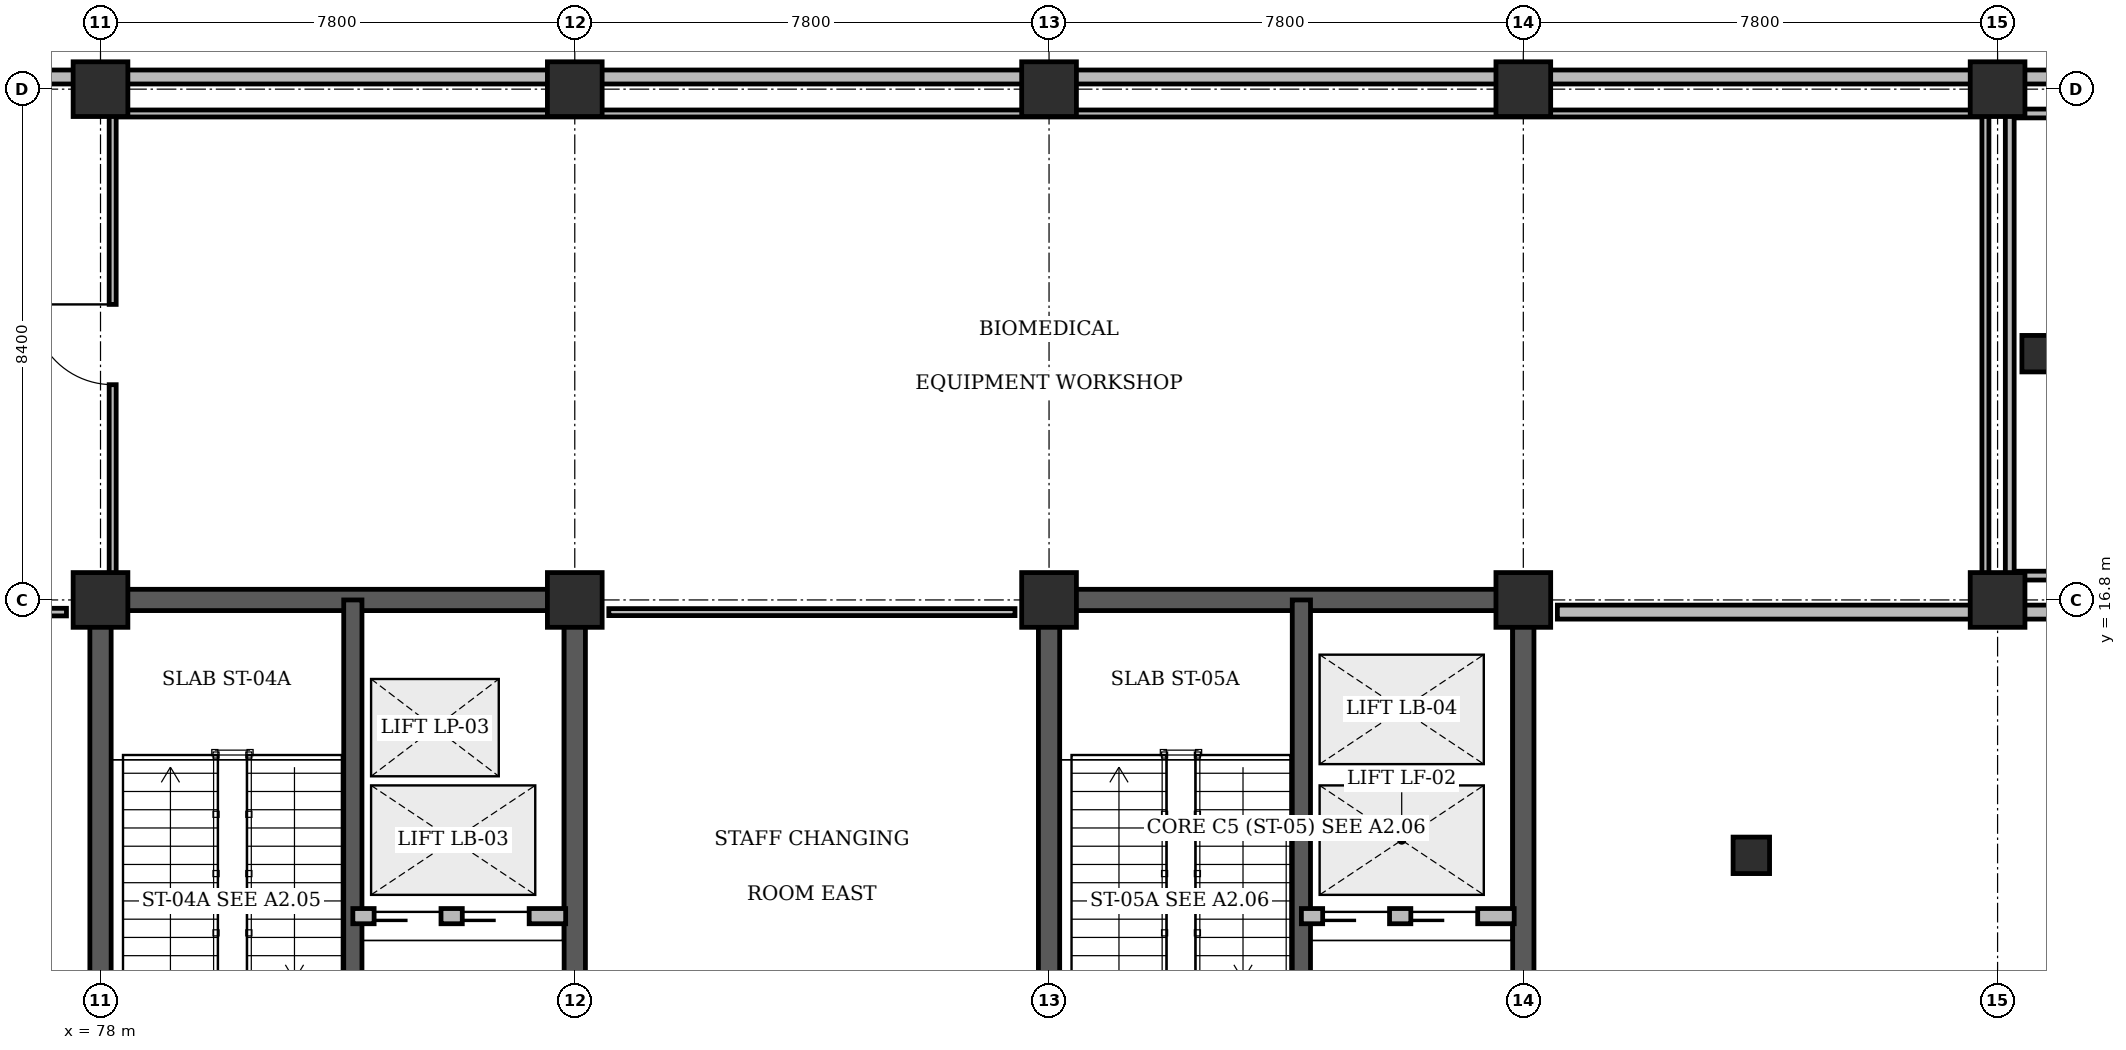
"""IFC4 building model, lengths in metres.
Left out: names, types, materials, properties, quantities, classifications, styles, units other than length and angle.
Written with IfcOpenShell. Run it as: python <this file> out.ifc"""

import sys

from ifc_helpers import new_model, si_unit, direction, frame, frame_2d, origin, origin_2d, place, context, subcontext, project, spatial, rectangle, circle, extrude, element, fill, save


model = new_model("IFC4")
c1 = context("Model", 3, precision=1e-05, world=origin(), true_north=direction((0.0, 1.0)))
c2 = subcontext(c1, "Body", "Model", "MODEL_VIEW")
j1 = project(units=[si_unit("LENGTHUNIT", "METRE"), si_unit("PLANEANGLEUNIT", "RADIAN")], contexts=[c1])
p1 = place(None, origin())
s1 = spatial("IfcSite", under=j1, at=p1, CompositionType="ELEMENT")
p2 = place(p1, origin())
s2 = spatial("IfcBuilding", under=s1, at=p2, CompositionType="ELEMENT")
p3 = place(p2, frame((0.0, 0.0, -4.8)))
s3 = spatial("IfcBuildingStorey", under=s2, at=p3, CompositionType="ELEMENT", Elevation=-4.8)
p4 = place(p3, frame((77.825, 16.8, 0.0), z_axis=(0.0, 0.0, 1.0), x_axis=(1.0, 0.0, 0.0)))
e1 = element("IfcWall", 1, at=p4, inside=s3, PredefinedType="SHEAR", context=c2, shape_type="SweptSolid", body=[
    extrude(rectangle(XDim=8.15, YDim=0.35, at=frame_2d((4.075, 0.0))), origin(), (0.0, 0.0, 1.0), 4.4),
])
for number, where, z_axis, x_axis in (
    (2, (78.0, 8.4, 0.0), (0.0, 0.0, 1.0), (0.0, 1.0, 0.0)),
    (3, (85.8, 8.4, 0.0), (0.0, 0.0, 1.0), (0.0, 1.0, 0.0)),
):
    element("IfcWall", number, at=place(p3, frame(where, z_axis=z_axis, x_axis=x_axis)), inside=s3, PredefinedType="SHEAR", context=c2, shape_type="SweptSolid", body=[
        extrude(rectangle(XDim=8.4, YDim=0.35, at=frame_2d((4.2, 0.0))), origin(), (0.0, 0.0, 1.0), 4.4),
    ])
p5 = place(p3, frame((93.425, 16.8, 0.0), z_axis=(0.0, 0.0, 1.0), x_axis=(1.0, 0.0, 0.0)))
e4 = element("IfcWall", 4, at=p5, inside=s3, PredefinedType="SHEAR", context=c2, shape_type="SweptSolid", body=[
    extrude(rectangle(XDim=8.15, YDim=0.35, at=frame_2d((4.075, 0.0))), origin(), (0.0, 0.0, 1.0), 4.4),
])
for number, where, z_axis, x_axis in (
    (5, (93.6, 8.4, 0.0), (0.0, 0.0, 1.0), (0.0, 1.0, 0.0)),
    (6, (101.4, 8.4, 0.0), (0.0, 0.0, 1.0), (0.0, 1.0, 0.0)),
):
    element("IfcWall", number, at=place(p3, frame(where, z_axis=z_axis, x_axis=x_axis)), inside=s3, PredefinedType="SHEAR", context=c2, shape_type="SweptSolid", body=[
        extrude(rectangle(XDim=8.4, YDim=0.35, at=frame_2d((4.2, 0.0))), origin(), (0.0, 0.0, 1.0), 4.4),
    ])
for number, where, z_axis, x_axis in (
    (7, (78.0, 16.8, 0.0), (0.0, 0.0, 1.0), (1.0, 0.0, 0.0)),
    (8, (78.0, 25.2, 0.0), (0.0, 0.0, 1.0), (1.0, 0.0, 0.0)),
    (9, (85.8, 16.8, 0.0), (0.0, 0.0, 1.0), (1.0, 0.0, 0.0)),
    (10, (85.8, 25.2, 0.0), (0.0, 0.0, 1.0), (1.0, 0.0, 0.0)),
    (11, (93.6, 16.8, 0.0), (0.0, 0.0, 1.0), (1.0, 0.0, 0.0)),
    (12, (93.6, 25.2, 0.0), (0.0, 0.0, 1.0), (1.0, 0.0, 0.0)),
    (13, (101.4, 16.8, 0.0), (0.0, 0.0, 1.0), (1.0, 0.0, 0.0)),
    (14, (101.4, 25.2, 0.0), (0.0, 0.0, 1.0), (1.0, 0.0, 0.0)),
    (15, (109.2, 16.8, 0.0), (0.0, 0.0, 1.0), (1.0, 0.0, 0.0)),
    (16, (109.2, 25.2, 0.0), (0.0, 0.0, 1.0), (1.0, 0.0, 0.0)),
):
    element("IfcColumn", number, at=place(p3, frame(where, z_axis=z_axis, x_axis=x_axis)), inside=s3, PredefinedType="COLUMN", context=c2, shape_type="SweptSolid", body=[
        extrude(rectangle(XDim=0.9, YDim=0.9, at=origin_2d()), origin(), (0.0, 0.0, 1.0), 4.8),
    ])
for number, where, z_axis, x_axis in (
    (17, (109.9, 20.85, -0.4), (0.0, 0.0, 1.0), (1.0, 0.0, 0.0)),
    (18, (105.15, 12.6, -0.4), (0.0, 0.0, 1.0), (1.0, 0.0, 0.0)),
):
    element("IfcColumn", number, at=place(p3, frame(where, z_axis=z_axis, x_axis=x_axis)), inside=s3, PredefinedType="PILASTER", context=c2, shape_type="SweptSolid", body=[
        extrude(circle(Radius=0.3, at=origin_2d()), origin(), (0.0, 0.0, 1.0), 5.2),
    ])
p6 = place(p3, frame((82.15, 8.4, 0.0), z_axis=(0.0, 0.0, 1.0), x_axis=(0.0, 1.0, 0.0)))
e19 = element("IfcWall", 19, at=p6, inside=s3, PredefinedType="SHEAR", context=c2, shape_type="SweptSolid", body=[
    extrude(rectangle(XDim=8.4, YDim=0.3, at=frame_2d((4.2, 0.0))), origin(), (0.0, 0.0, 1.0), 4.8),
])
p7 = place(p3, frame((82.15, 11.6, 0.0), z_axis=(0.0, 0.0, 1.0), x_axis=(1.0, 0.0, 0.0)))
e20 = element("IfcWall", 20, at=p7, inside=s3, PredefinedType="STANDARD", context=c2, shape_type="SweptSolid", body=[
    extrude(rectangle(XDim=3.5, YDim=0.25, at=frame_2d((1.75, 0.0))), origin(), (0.0, 0.0, 1.0), 4.46),
])
p8 = place(p7, frame((0.35, 0.0, 0.0)))
e21 = element("IfcOpeningElement", 21, at=p8, cuts=e20, PredefinedType="OPENING", context=c2, shape_type="SweptSolid", body=[
    extrude(rectangle(XDim=1.1, YDim=2.2, at=frame_2d((0.55, 1.1))), frame((0.0, 0.135, 0.0), z_axis=(0.0, -1.0, 0.0), x_axis=(1.0, 0.0, 0.0)), (0.0, 0.0, 1.0), 0.27),
])
p9 = place(p7, frame((1.8, 0.0, 0.0)))
e22 = element("IfcOpeningElement", 22, at=p9, cuts=e20, PredefinedType="OPENING", context=c2, shape_type="SweptSolid", body=[
    extrude(rectangle(XDim=1.1, YDim=2.2, at=frame_2d((0.55, 1.1))), frame((0.0, 0.135, 0.0), z_axis=(0.0, -1.0, 0.0), x_axis=(1.0, 0.0, 0.0)), (0.0, 0.0, 1.0), 0.27),
])
p10 = place(p3, frame((97.75, 8.4, 0.0), z_axis=(0.0, 0.0, 1.0), x_axis=(0.0, 1.0, 0.0)))
e23 = element("IfcWall", 23, at=p10, inside=s3, PredefinedType="SHEAR", context=c2, shape_type="SweptSolid", body=[
    extrude(rectangle(XDim=8.4, YDim=0.3, at=frame_2d((4.2, 0.0))), origin(), (0.0, 0.0, 1.0), 4.8),
])
p11 = place(p10, frame((0.4, 0.0, 0.0)))
e24 = element("IfcOpeningElement", 24, at=p11, cuts=e23, PredefinedType="OPENING", context=c2, shape_type="SweptSolid", body=[
    extrude(rectangle(XDim=1.12, YDim=2.15, at=frame_2d((0.56, 1.075))), frame((0.0, 0.16, 0.0), z_axis=(0.0, -1.0, 0.0), x_axis=(1.0, 0.0, 0.0)), (0.0, 0.0, 1.0), 0.32),
])
p12 = place(p3, frame((97.75, 11.6, 0.0), z_axis=(0.0, 0.0, 1.0), x_axis=(1.0, 0.0, 0.0)))
e25 = element("IfcWall", 25, at=p12, inside=s3, PredefinedType="STANDARD", context=c2, shape_type="SweptSolid", body=[
    extrude(rectangle(XDim=3.5, YDim=0.25, at=frame_2d((1.75, 0.0))), origin(), (0.0, 0.0, 1.0), 4.46),
])
p13 = place(p12, frame((0.35, 0.0, 0.0)))
e26 = element("IfcOpeningElement", 26, at=p13, cuts=e25, PredefinedType="OPENING", context=c2, shape_type="SweptSolid", body=[
    extrude(rectangle(XDim=1.1, YDim=2.2, at=frame_2d((0.55, 1.1))), frame((0.0, 0.135, 0.0), z_axis=(0.0, -1.0, 0.0), x_axis=(1.0, 0.0, 0.0)), (0.0, 0.0, 1.0), 0.27),
])
p14 = place(p12, frame((1.8, 0.0, 0.0)))
e27 = element("IfcOpeningElement", 27, at=p14, cuts=e25, PredefinedType="OPENING", context=c2, shape_type="SweptSolid", body=[
    extrude(rectangle(XDim=1.1, YDim=2.2, at=frame_2d((0.55, 1.1))), frame((0.0, 0.135, 0.0), z_axis=(0.0, -1.0, 0.0), x_axis=(1.0, 0.0, 0.0)), (0.0, 0.0, 1.0), 0.27),
])
p15 = place(p3, frame((74.0, 16.6, 0.0), z_axis=(0.0, 0.0, 1.0), x_axis=(1.0, 0.0, 0.0)))
e28 = element("IfcWall", 28, at=p15, inside=s3, PredefinedType="PARTITIONING", context=c2, shape_type="SweptSolid", body=[
    extrude(rectangle(XDim=3.44, YDim=0.125, at=frame_2d((1.72, 0.0))), origin(), (0.0, 0.0, 1.0), 3.53),
])
p16 = place(p3, frame((78.2, 24.8, 0.0), z_axis=(0.0, 0.0, 1.0), x_axis=(1.0, 0.0, 0.0)))
e29 = element("IfcWall", 29, at=p16, inside=s3, PredefinedType="PARTITIONING", context=c2, shape_type="SweptSolid", body=[
    extrude(rectangle(XDim=30.8, YDim=0.115, at=frame_2d((15.4, 0.0))), origin(), (0.0, 0.0, 1.0), 3.53),
])
p17 = place(p3, frame((78.2, 17.2, 0.0), z_axis=(0.0, 0.0, 1.0), x_axis=(0.0, 1.0, 0.0)))
e30 = element("IfcWall", 30, at=p17, inside=s3, PredefinedType="PARTITIONING", context=c2, shape_type="SweptSolid", body=[
    extrude(rectangle(XDim=7.6, YDim=0.115, at=frame_2d((3.8, 0.0))), origin(), (0.0, 0.0, 1.0), 3.515),
])
p18 = place(p17, frame((3.14, 0.0, 0.0)))
e31 = element("IfcOpeningElement", 31, at=p18, cuts=e30, PredefinedType="OPENING", context=c2, shape_type="SweptSolid", body=[
    extrude(rectangle(XDim=1.32, YDim=2.15, at=frame_2d((0.66, 1.075))), frame((0.0, 0.067, 0.0), z_axis=(0.0, -1.0, 0.0), x_axis=(1.0, 0.0, 0.0)), (0.0, 0.0, 1.0), 0.135),
])
p19 = place(p3, frame((109.0, 17.2, 0.0), z_axis=(0.0, 0.0, 1.0), x_axis=(0.0, 1.0, 0.0)))
e32 = element("IfcWall", 32, at=p19, inside=s3, PredefinedType="PARTITIONING", context=c2, shape_type="SweptSolid", body=[
    extrude(rectangle(XDim=7.6, YDim=0.115, at=frame_2d((3.8, 0.0))), origin(), (0.0, 0.0, 1.0), 3.515),
])
p20 = place(p3, frame((109.4, 17.2, 0.0), z_axis=(0.0, 0.0, 1.0), x_axis=(1.0, 0.0, 0.0)))
e33 = element("IfcWall", 33, at=p20, inside=s3, PredefinedType="PARTITIONING", context=c2, shape_type="SweptSolid", body=[
    extrude(rectangle(XDim=22.8, YDim=0.145, at=frame_2d((11.4, 0.0))), origin(), (0.0, 0.0, 1.0), 3.53),
])
p21 = place(p20, frame((10.825, 0.0, 0.0)))
e34 = element("IfcOpeningElement", 34, at=p21, cuts=e33, PredefinedType="OPENING", context=c2, shape_type="SweptSolid", body=[
    extrude(rectangle(XDim=1.15, YDim=2.15, at=frame_2d((0.575, 1.075))), frame((0.0, 0.083, 0.0), z_axis=(0.0, -1.0, 0.0), x_axis=(1.0, 0.0, 0.0)), (0.0, 0.0, 1.0), 0.165),
])
p22 = place(p3, frame((109.4, 24.8, 0.0), z_axis=(0.0, 0.0, 1.0), x_axis=(1.0, 0.0, 0.0)))
e35 = element("IfcWall", 35, at=p22, inside=s3, PredefinedType="PARTITIONING", context=c2, shape_type="SweptSolid", body=[
    extrude(rectangle(XDim=22.8, YDim=0.145, at=frame_2d((11.4, 0.0))), origin(), (0.0, 0.0, 1.0), 3.53),
])
p23 = place(p3, frame((109.4, 17.2, 0.0), z_axis=(0.0, 0.0, 1.0), x_axis=(0.0, 1.0, 0.0)))
e36 = element("IfcWall", 36, at=p23, inside=s3, PredefinedType="PARTITIONING", context=c2, shape_type="SweptSolid", body=[
    extrude(rectangle(XDim=7.6, YDim=0.145, at=frame_2d((3.8, 0.0))), origin(), (0.0, 0.0, 1.0), 3.515),
])
p24 = place(p3, frame((86.36, 16.6, 0.0), z_axis=(0.0, 0.0, 1.0), x_axis=(1.0, 0.0, 0.0)))
e37 = element("IfcWall", 37, at=p24, inside=s3, PredefinedType="PARTITIONING", context=c2, shape_type="SweptSolid", body=[
    extrude(rectangle(XDim=6.68, YDim=0.115, at=frame_2d((3.34, 0.0))), origin(), (0.0, 0.0, 1.0), 3.53),
])
p25 = place(p3, frame((101.96, 16.6, 0.0), z_axis=(0.0, 0.0, 1.0), x_axis=(1.0, 0.0, 0.0)))
e38 = element("IfcWall", 38, at=p25, inside=s3, PredefinedType="STANDARD", context=c2, shape_type="SweptSolid", body=[
    extrude(rectangle(XDim=30.24, YDim=0.23, at=frame_2d((15.12, 0.0))), origin(), (0.0, 0.0, 1.0), 3.53),
])
p26 = place(p3, frame((74.0, 25.4, 0.0), z_axis=(0.0, 0.0, 1.0), x_axis=(1.0, 0.0, 0.0)))
e39 = element("IfcWall", 39, at=p26, inside=s3, PredefinedType="STANDARD", context=c2, shape_type="SweptSolid", body=[
    extrude(rectangle(XDim=58.2, YDim=0.23, at=frame_2d((29.1, 0.0))), origin(), (0.0, 0.0, 1.0), 3.53),
])
p27 = place(p8, origin())
e40 = element("IfcDoor", 40, at=p27, inside=s3, OperationType="SLIDING_TO_LEFT", PredefinedType="DOOR", context=c2, shape_type="SweptSolid", body=[
    extrude(rectangle(XDim=1.1, YDim=2.2, at=frame_2d((0.55, 1.1))), frame((0.0, 0.025, 0.0), z_axis=(0.0, -1.0, 0.0), x_axis=(1.0, 0.0, 0.0)), (0.0, 0.0, 1.0), 0.05),
])
fill(e21, e40)
p28 = place(p9, origin())
e41 = element("IfcDoor", 41, at=p28, inside=s3, OperationType="SLIDING_TO_LEFT", PredefinedType="DOOR", context=c2, shape_type="SweptSolid", body=[
    extrude(rectangle(XDim=1.1, YDim=2.2, at=frame_2d((0.55, 1.1))), frame((0.0, 0.025, 0.0), z_axis=(0.0, -1.0, 0.0), x_axis=(1.0, 0.0, 0.0)), (0.0, 0.0, 1.0), 0.05),
])
fill(e22, e41)
p29 = place(p13, origin())
e42 = element("IfcDoor", 42, at=p29, inside=s3, OperationType="SLIDING_TO_LEFT", PredefinedType="DOOR", context=c2, shape_type="SweptSolid", body=[
    extrude(rectangle(XDim=1.1, YDim=2.2, at=frame_2d((0.55, 1.1))), frame((0.0, 0.025, 0.0), z_axis=(0.0, -1.0, 0.0), x_axis=(1.0, 0.0, 0.0)), (0.0, 0.0, 1.0), 0.05),
])
fill(e26, e42)
p30 = place(p14, origin())
e43 = element("IfcDoor", 43, at=p30, inside=s3, OperationType="SLIDING_TO_LEFT", PredefinedType="DOOR", context=c2, shape_type="SweptSolid", body=[
    extrude(rectangle(XDim=1.1, YDim=2.2, at=frame_2d((0.55, 1.1))), frame((0.0, 0.025, 0.0), z_axis=(0.0, -1.0, 0.0), x_axis=(1.0, 0.0, 0.0)), (0.0, 0.0, 1.0), 0.05),
])
fill(e27, e43)
p31 = place(p18, origin())
e44 = element("IfcDoor", 44, at=p31, inside=s3, OperationType="SINGLE_SWING_RIGHT", PredefinedType="DOOR", context=c2, shape_type="SweptSolid", body=[
    extrude(rectangle(XDim=1.32, YDim=2.15, at=frame_2d((0.66, 1.075))), frame((0.0, 0.025, 0.0), z_axis=(0.0, -1.0, 0.0), x_axis=(1.0, 0.0, 0.0)), (0.0, 0.0, 1.0), 0.05),
])
fill(e31, e44)
save(model, sys.argv[1])
